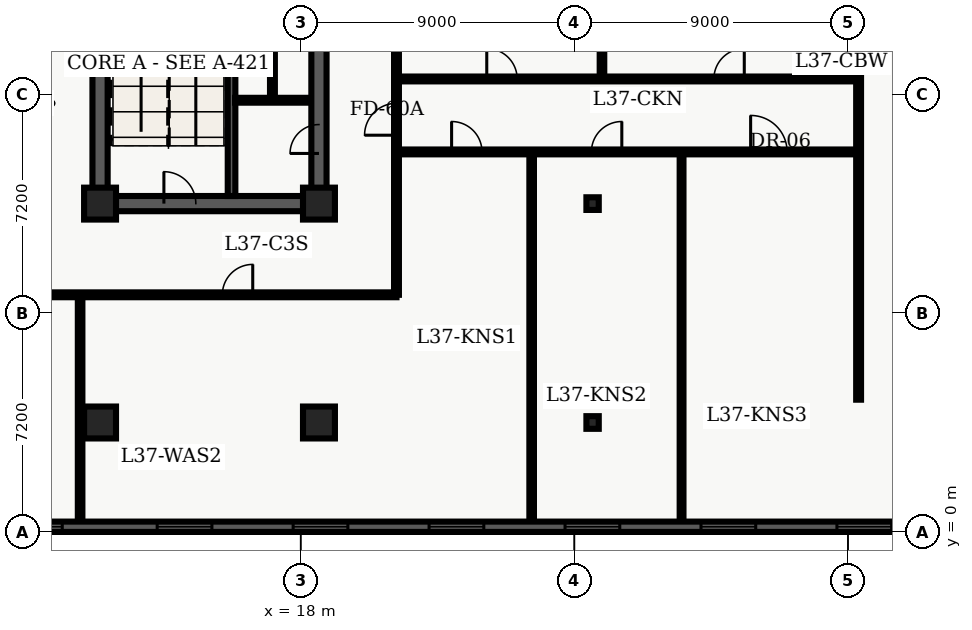
"""IFC4 building model, lengths in metres.
Left out: names, types, materials, properties, quantities, classifications, styles, units other than length and angle.
Written with IfcOpenShell. Run it as: python <this file> out.ifc"""

import sys

from ifc_helpers import new_model, entity, si_unit, converted_unit, direction, frame, origin_with_axes, origin_2d_with_axis, place, context, subcontext, project, spatial, polyline, rectangle, i_section, outline, extrude, element, fill, save


model = new_model("IFC4")
c1 = context("Model", 3, precision=1e-05, world=origin_with_axes(), true_north=direction((0.0, 1.0)))
c2 = subcontext(c1, "Body", "Model", "MODEL_VIEW")
j1 = project(units=[si_unit("LENGTHUNIT", "METRE"), converted_unit("PLANEANGLEUNIT", "DEGREE", entity("IfcPlaneAngleMeasure", 0.017), si_unit("PLANEANGLEUNIT", "RADIAN"), dimensions=[0, 0, 0, 0, 0, 0, 0])], contexts=[c1])
p1 = place(None, origin_with_axes())
s1 = spatial("IfcSite", under=j1, at=p1, CompositionType="ELEMENT")
p2 = place(p1, origin_with_axes())
s2 = spatial("IfcBuilding", under=s1, at=p2, CompositionType="ELEMENT")
p3 = place(p2, frame((0.0, 0.0, 152.4), z_axis=(0.0, 0.0, 1.0), x_axis=(1.0, 0.0, 0.0)))
s3 = spatial("IfcBuildingStorey", under=s2, at=p3, CompositionType="ELEMENT", Elevation=152.4)
p4 = place(p3, frame((11.4, 10.8, 0.0), z_axis=(0.0, 0.0, 1.0), x_axis=(0.0, 1.0, 0.0)))
e1 = element("IfcWall", 1, at=p4, inside=s3, PredefinedType="SHEAR", context=c2, shape_type="SweptSolid", body=[
    extrude(outline(polyline([(0.0, -0.25), (27.0, -0.25), (27.0, 0.25), (0.0, 0.25), (0.0, -0.25)])), origin_with_axes(), (0.0, 0.0, 1.0), 3.66),
])
p5 = place(p3, frame((11.4, 10.8, 0.0), z_axis=(0.0, 0.0, 1.0), x_axis=(1.0, 0.0, 0.0)))
e2 = element("IfcWall", 2, at=p5, inside=s3, PredefinedType="SHEAR", context=c2, shape_type="SweptSolid", body=[
    extrude(outline(polyline([(0.0, -0.25), (7.2, -0.25), (7.2, 0.25), (0.0, 0.25), (0.0, -0.25)])), origin_with_axes(), (0.0, 0.0, 1.0), 3.66),
])
p6 = place(p5, frame((2.625, 0.0, 0.0), z_axis=(0.0, 0.0, 1.0), x_axis=(1.0, 0.0, 0.0)))
e3 = element("IfcOpeningElement", 3, at=p6, cuts=e2, PredefinedType="OPENING", context=c2, shape_type="SweptSolid", body=[
    extrude(rectangle(XDim=1.05, YDim=0.52, at=origin_2d_with_axis()), origin_with_axes(), (0.0, 0.0, 1.0), 2.15),
])
p7 = place(p3, frame((18.6, 10.8, 0.0), z_axis=(0.0, 0.0, 1.0), x_axis=(0.0, 1.0, 0.0)))
e4 = element("IfcWall", 4, at=p7, inside=s3, PredefinedType="SHEAR", context=c2, shape_type="SweptSolid", body=[
    extrude(outline(polyline([(0.0, -0.25), (13.5, -0.25), (13.5, 0.25), (0.0, 0.25), (0.0, -0.25)])), origin_with_axes(), (0.0, 0.0, 1.0), 3.66),
])
p8 = place(p7, frame((11.125, 0.0, 0.0), z_axis=(0.0, 0.0, 1.0), x_axis=(1.0, 0.0, 0.0)))
e5 = element("IfcOpeningElement", 5, at=p8, cuts=e4, PredefinedType="OPENING", context=c2, shape_type="SweptSolid", body=[
    extrude(rectangle(XDim=1.05, YDim=0.52, at=origin_2d_with_axis()), origin_with_axes(), (0.0, 0.0, 1.0), 2.15),
])
p9 = place(p7, frame((2.125, 0.0, 0.0), z_axis=(0.0, 0.0, 1.0), x_axis=(1.0, 0.0, 0.0)))
e6 = element("IfcOpeningElement", 6, at=p9, cuts=e4, PredefinedType="OPENING", context=c2, shape_type="SweptSolid", body=[
    extrude(rectangle(XDim=0.95, YDim=0.52, at=origin_2d_with_axis()), origin_with_axes(), (0.0, 0.0, 1.0), 2.15),
])
p10 = place(p7, frame((6.275, 0.0, 0.0), z_axis=(0.0, 0.0, 1.0), x_axis=(1.0, 0.0, 0.0)))
e7 = element("IfcOpeningElement", 7, at=p10, cuts=e4, PredefinedType="OPENING", context=c2, shape_type="SweptSolid", body=[
    extrude(rectangle(XDim=0.95, YDim=0.52, at=origin_2d_with_axis()), origin_with_axes(), (0.0, 0.0, 1.0), 2.15),
])
p11 = place(p3, frame((15.725, 11.05, 0.0), z_axis=(0.0, 0.0, 1.0), x_axis=(0.0, 1.0, 0.0)))
e8 = element("IfcWall", 8, at=p11, inside=s3, PredefinedType="SHEAR", context=c2, shape_type="SweptSolid", body=[
    extrude(outline(polyline([(0.0, -0.125), (8.65, -0.125), (8.65, 0.125), (0.0, 0.125), (0.0, -0.125)])), origin_with_axes(), (0.0, 0.0, 1.0), 3.66),
])
for number, where, z_axis, x_axis in (
    (9, (11.4, 3.6, 0.0), (0.0, 0.0, 1.0), (1.0, 0.0, 0.0)),
    (10, (11.4, 10.8, 0.0), (0.0, 0.0, 1.0), (1.0, 0.0, 0.0)),
    (11, (18.6, 3.6, 0.0), (0.0, 0.0, 1.0), (1.0, 0.0, 0.0)),
    (12, (18.6, 10.8, 0.0), (0.0, 0.0, 1.0), (1.0, 0.0, 0.0)),
):
    element("IfcColumn", number, at=place(p3, frame(where, z_axis=z_axis, x_axis=x_axis)), inside=s3, PredefinedType="COLUMN", context=c2, shape_type="SweptSolid", body=[
        extrude(rectangle(XDim=1.05, YDim=1.05, at=origin_2d_with_axis()), origin_with_axes(), (0.0, 0.0, 1.0), 3.9),
    ])
for number, where, z_axis, x_axis in (
    (13, (27.6, 3.6, 0.0), (0.0, 0.0, 1.0), (1.0, 0.0, 0.0)),
    (14, (27.6, 10.8, 0.0), (0.0, 0.0, 1.0), (1.0, 0.0, 0.0)),
):
    element("IfcColumn", number, at=place(p3, frame(where, z_axis=z_axis, x_axis=x_axis)), inside=s3, PredefinedType="COLUMN", context=c2, shape_type="SweptSolid", body=[
        extrude(i_section(OverallWidth=0.406, OverallDepth=0.416, WebThickness=0.03, FlangeThickness=0.048, FilletRadius=0.022, at=origin_2d_with_axis()), origin_with_axes(), (0.0, 0.0, 1.0), 3.9),
    ])
p12 = place(p3, frame((15.84, 14.2, 0.0), z_axis=(0.0, 0.0, 1.0), x_axis=(1.0, 0.0, 0.0)))
e15 = element("IfcWall", 15, at=p12, inside=s3, PredefinedType="PARTITIONING", context=c2, shape_type="SweptSolid", body=[
    extrude(outline(polyline([(0.0, -0.08), (2.46, -0.08), (2.46, 0.08), (0.0, 0.08), (0.0, -0.08)])), origin_with_axes(), (0.0, 0.0, 1.0), 2.7),
])
p13 = place(p3, frame((17.07, 14.28, 0.0), z_axis=(0.0, 0.0, 1.0), x_axis=(0.0, 1.0, 0.0)))
e16 = element("IfcWall", 16, at=p13, inside=s3, PredefinedType="PARTITIONING", context=c2, shape_type="SweptSolid", body=[
    extrude(outline(polyline([(0.0, -0.08), (5.42, -0.08), (5.42, 0.08), (0.0, 0.08), (0.0, -0.08)])), origin_with_axes(), (0.0, 0.0, 1.0), 2.7),
])
p14 = place(p13, frame((2.6, 0.0, 0.0), z_axis=(0.0, 0.0, 1.0), x_axis=(1.0, 0.0, 0.0)))
e17 = element("IfcOpeningElement", 17, at=p14, cuts=e16, PredefinedType="OPENING", context=c2, shape_type="SweptSolid", body=[
    extrude(rectangle(XDim=0.9, YDim=0.18, at=origin_2d_with_axis()), origin_with_axes(), (0.0, 0.0, 1.0), 2.15),
])
p15 = place(p3, frame((2.6, 7.8, 0.0), z_axis=(0.0, 0.0, 1.0), x_axis=(1.0, 0.0, 0.0)))
e18 = element("IfcWall", 18, at=p15, inside=s3, PredefinedType="PARTITIONING", context=c2, shape_type="SweptSolid", body=[
    extrude(outline(polyline([(0.0, -0.08), (18.55, -0.08), (18.55, 0.08), (0.0, 0.08), (0.0, -0.08)])), origin_with_axes(), (0.0, 0.0, 1.0), 2.7),
])
p16 = place(p15, frame((3.787, 0.0, 0.0), z_axis=(0.0, 0.0, 1.0), x_axis=(1.0, 0.0, 0.0)))
e19 = element("IfcOpeningElement", 19, at=p16, cuts=e18, PredefinedType="OPENING", context=c2, shape_type="SweptSolid", body=[
    extrude(rectangle(XDim=1.0, YDim=0.18, at=origin_2d_with_axis()), origin_with_axes(), (0.0, 0.0, 1.0), 2.15),
])
p17 = place(p15, frame((13.322, 0.0, 0.0), z_axis=(0.0, 0.0, 1.0), x_axis=(1.0, 0.0, 0.0)))
e20 = element("IfcOpeningElement", 20, at=p17, cuts=e18, PredefinedType="OPENING", context=c2, shape_type="SweptSolid", body=[
    extrude(rectangle(XDim=1.0, YDim=0.18, at=origin_2d_with_axis()), origin_with_axes(), (0.0, 0.0, 1.0), 2.15),
])
p18 = place(p3, frame((21.15, 7.8, 0.0), z_axis=(0.0, 0.0, 1.0), x_axis=(0.0, 1.0, 0.0)))
e21 = element("IfcWall", 21, at=p18, inside=s3, PredefinedType="PARTITIONING", context=c2, shape_type="SweptSolid", body=[
    extrude(outline(polyline([(0.0, -0.08), (32.7, -0.08), (32.7, 0.08), (0.0, 0.08), (0.0, -0.08)])), origin_with_axes(), (0.0, 0.0, 1.0), 2.7),
])
p19 = place(p18, frame((5.775, 0.0, 0.0), z_axis=(0.0, 0.0, 1.0), x_axis=(1.0, 0.0, 0.0)))
e22 = element("IfcOpeningElement", 22, at=p19, cuts=e21, PredefinedType="OPENING", context=c2, shape_type="SweptSolid", body=[
    extrude(rectangle(XDim=1.05, YDim=0.18, at=origin_2d_with_axis()), origin_with_axes(), (0.0, 0.0, 1.0), 2.15),
])
p20 = place(p3, frame((10.744, 0.335, 0.0), z_axis=(0.0, 0.0, 1.0), x_axis=(0.0, 1.0, 0.0)))
e23 = element("IfcWall", 23, at=p20, inside=s3, PredefinedType="PARTITIONING", context=c2, shape_type="SweptSolid", body=[
    extrude(outline(polyline([(0.0, -0.075), (7.365, -0.075), (7.365, 0.075), (0.0, 0.075), (0.0, -0.075)])), origin_with_axes(), (0.0, 0.0, 1.0), 2.7),
])
p21 = place(p3, frame((21.15, 12.5, 0.0), z_axis=(0.0, 0.0, 1.0), x_axis=(1.0, 0.0, 0.0)))
e24 = element("IfcWall", 24, at=p21, inside=s3, PredefinedType="PARTITIONING", context=c2, shape_type="SweptSolid", body=[
    extrude(outline(polyline([(0.0, -0.08), (15.2, -0.08), (15.2, 0.08), (0.0, 0.08), (0.0, -0.08)])), origin_with_axes(), (0.0, 0.0, 1.0), 2.7),
])
p22 = place(p21, frame((2.313, 0.0, 0.0), z_axis=(0.0, 0.0, 1.0), x_axis=(1.0, 0.0, 0.0)))
e25 = element("IfcOpeningElement", 25, at=p22, cuts=e24, PredefinedType="OPENING", context=c2, shape_type="SweptSolid", body=[
    extrude(rectangle(XDim=1.0, YDim=0.18, at=origin_2d_with_axis()), origin_with_axes(), (0.0, 0.0, 1.0), 2.15),
])
p23 = place(p21, frame((6.912, 0.0, 0.0), z_axis=(0.0, 0.0, 1.0), x_axis=(1.0, 0.0, 0.0)))
e26 = element("IfcOpeningElement", 26, at=p23, cuts=e24, PredefinedType="OPENING", context=c2, shape_type="SweptSolid", body=[
    extrude(rectangle(XDim=1.0, YDim=0.18, at=origin_2d_with_axis()), origin_with_axes(), (0.0, 0.0, 1.0), 2.15),
])
p24 = place(p21, frame((12.248, 0.0, 0.0), z_axis=(0.0, 0.0, 1.0), x_axis=(1.0, 0.0, 0.0)))
e27 = element("IfcOpeningElement", 27, at=p24, cuts=e24, PredefinedType="OPENING", context=c2, shape_type="SweptSolid", body=[
    extrude(rectangle(XDim=1.2, YDim=0.18, at=origin_2d_with_axis()), origin_with_axes(), (0.0, 0.0, 1.0), 2.2),
])
p25 = place(p3, frame((21.15, 14.9, 0.0), z_axis=(0.0, 0.0, 1.0), x_axis=(1.0, 0.0, 0.0)))
e28 = element("IfcWall", 28, at=p25, inside=s3, PredefinedType="PARTITIONING", context=c2, shape_type="SweptSolid", body=[
    extrude(outline(polyline([(0.0, -0.08), (15.2, -0.08), (15.2, 0.08), (0.0, 0.08), (0.0, -0.08)])), origin_with_axes(), (0.0, 0.0, 1.0), 2.7),
])
p26 = place(p25, frame((3.47, 0.0, 0.0), z_axis=(0.0, 0.0, 1.0), x_axis=(1.0, 0.0, 0.0)))
e29 = element("IfcOpeningElement", 29, at=p26, cuts=e28, PredefinedType="OPENING", context=c2, shape_type="SweptSolid", body=[
    extrude(rectangle(XDim=1.0, YDim=0.18, at=origin_2d_with_axis()), origin_with_axes(), (0.0, 0.0, 1.0), 2.15),
])
p27 = place(p25, frame((10.94, 0.0, 0.0), z_axis=(0.0, 0.0, 1.0), x_axis=(1.0, 0.0, 0.0)))
e30 = element("IfcOpeningElement", 30, at=p27, cuts=e28, PredefinedType="OPENING", context=c2, shape_type="SweptSolid", body=[
    extrude(rectangle(XDim=1.0, YDim=0.18, at=origin_2d_with_axis()), origin_with_axes(), (0.0, 0.0, 1.0), 2.15),
])
p28 = place(p3, frame((36.35, 4.35, 0.0), z_axis=(0.0, 0.0, 1.0), x_axis=(0.0, 1.0, 0.0)))
e31 = element("IfcWall", 31, at=p28, inside=s3, PredefinedType="PARTITIONING", context=c2, shape_type="SweptSolid", body=[
    extrude(outline(polyline([(0.0, -0.08), (16.95, -0.08), (16.95, 0.08), (0.0, 0.08), (0.0, -0.08)])), origin_with_axes(), (0.0, 0.0, 1.0), 2.7),
])
p29 = place(p3, frame((25.596, 0.335, 0.0), z_axis=(0.0, 0.0, 1.0), x_axis=(0.0, 1.0, 0.0)))
e32 = element("IfcWall", 32, at=p29, inside=s3, PredefinedType="PARTITIONING", context=c2, shape_type="SweptSolid", body=[
    extrude(outline(polyline([(0.0, -0.075), (12.045, -0.075), (12.045, 0.075), (0.0, 0.075), (0.0, -0.075)])), origin_with_axes(), (0.0, 0.0, 1.0), 2.7),
])
p30 = place(p3, frame((30.527, 0.335, 0.0), z_axis=(0.0, 0.0, 1.0), x_axis=(0.0, 1.0, 0.0)))
e33 = element("IfcWall", 33, at=p30, inside=s3, PredefinedType="PARTITIONING", context=c2, shape_type="SweptSolid", body=[
    extrude(outline(polyline([(0.0, -0.062), (12.045, -0.062), (12.045, 0.062), (0.0, 0.062), (0.0, -0.062)])), origin_with_axes(), (0.0, 0.0, 1.0), 2.7),
])
p31 = place(p3, frame((27.909, 15.02, 0.0), z_axis=(0.0, 0.0, 1.0), x_axis=(0.0, 1.0, 0.0)))
e34 = element("IfcWall", 34, at=p31, inside=s3, PredefinedType="PARTITIONING", context=c2, shape_type="SweptSolid", body=[
    extrude(outline(polyline([(0.0, -0.075), (6.245, -0.075), (6.245, 0.075), (0.0, 0.075), (0.0, -0.075)])), origin_with_axes(), (0.0, 0.0, 1.0), 2.7),
])
p32 = place(p3, frame((57.26, 0.17, 0.0), z_axis=(0.0, 0.0, 1.0), x_axis=(-1.0, 0.0, 0.0)))
e35 = element("IfcWall", 35, at=p32, inside=s3, PredefinedType="SOLIDWALL", context=c2, shape_type="SweptSolid", body=[
    extrude(outline(polyline([(0.0, -0.17), (54.86, -0.17), (54.86, 0.17), (0.0, 0.17), (0.0, -0.17)])), origin_with_axes(), (0.0, 0.0, 1.0), 3.66),
])
p33 = place(p32, frame((2.836, 0.0, 0.45), z_axis=(0.0, 0.0, 1.0), x_axis=(1.0, 0.0, 0.0)))
e36 = element("IfcOpeningElement", 36, at=p33, cuts=e35, PredefinedType="OPENING", context=c2, shape_type="SweptSolid", body=[
    extrude(rectangle(XDim=1.8, YDim=0.36, at=origin_2d_with_axis()), origin_with_axes(), (0.0, 0.0, 1.0), 2.1),
])
p34 = place(p32, frame((7.307, 0.0, 0.45), z_axis=(0.0, 0.0, 1.0), x_axis=(1.0, 0.0, 0.0)))
e37 = element("IfcOpeningElement", 37, at=p34, cuts=e35, PredefinedType="OPENING", context=c2, shape_type="SweptSolid", body=[
    extrude(rectangle(XDim=1.8, YDim=0.36, at=origin_2d_with_axis()), origin_with_axes(), (0.0, 0.0, 1.0), 2.1),
])
p35 = place(p32, frame((11.779, 0.0, 0.45), z_axis=(0.0, 0.0, 1.0), x_axis=(1.0, 0.0, 0.0)))
e38 = element("IfcOpeningElement", 38, at=p35, cuts=e35, PredefinedType="OPENING", context=c2, shape_type="SweptSolid", body=[
    extrude(rectangle(XDim=1.8, YDim=0.36, at=origin_2d_with_axis()), origin_with_axes(), (0.0, 0.0, 1.0), 2.1),
])
p36 = place(p32, frame((16.251, 0.0, 0.45), z_axis=(0.0, 0.0, 1.0), x_axis=(1.0, 0.0, 0.0)))
e39 = element("IfcOpeningElement", 39, at=p36, cuts=e35, PredefinedType="OPENING", context=c2, shape_type="SweptSolid", body=[
    extrude(rectangle(XDim=1.8, YDim=0.36, at=origin_2d_with_axis()), origin_with_axes(), (0.0, 0.0, 1.0), 2.1),
])
p37 = place(p32, frame((20.723, 0.0, 0.45), z_axis=(0.0, 0.0, 1.0), x_axis=(1.0, 0.0, 0.0)))
e40 = element("IfcOpeningElement", 40, at=p37, cuts=e35, PredefinedType="OPENING", context=c2, shape_type="SweptSolid", body=[
    extrude(rectangle(XDim=1.8, YDim=0.36, at=origin_2d_with_axis()), origin_with_axes(), (0.0, 0.0, 1.0), 2.1),
])
p38 = place(p32, frame((25.194, 0.0, 0.45), z_axis=(0.0, 0.0, 1.0), x_axis=(1.0, 0.0, 0.0)))
e41 = element("IfcOpeningElement", 41, at=p38, cuts=e35, PredefinedType="OPENING", context=c2, shape_type="SweptSolid", body=[
    extrude(rectangle(XDim=1.8, YDim=0.36, at=origin_2d_with_axis()), origin_with_axes(), (0.0, 0.0, 1.0), 2.1),
])
p39 = place(p32, frame((29.666, 0.0, 0.45), z_axis=(0.0, 0.0, 1.0), x_axis=(1.0, 0.0, 0.0)))
e42 = element("IfcOpeningElement", 42, at=p39, cuts=e35, PredefinedType="OPENING", context=c2, shape_type="SweptSolid", body=[
    extrude(rectangle(XDim=1.8, YDim=0.36, at=origin_2d_with_axis()), origin_with_axes(), (0.0, 0.0, 1.0), 2.1),
])
p40 = place(p32, frame((34.138, 0.0, 0.45), z_axis=(0.0, 0.0, 1.0), x_axis=(1.0, 0.0, 0.0)))
e43 = element("IfcOpeningElement", 43, at=p40, cuts=e35, PredefinedType="OPENING", context=c2, shape_type="SweptSolid", body=[
    extrude(rectangle(XDim=1.8, YDim=0.36, at=origin_2d_with_axis()), origin_with_axes(), (0.0, 0.0, 1.0), 2.1),
])
p41 = place(p32, frame((38.609, 0.0, 0.45), z_axis=(0.0, 0.0, 1.0), x_axis=(1.0, 0.0, 0.0)))
e44 = element("IfcOpeningElement", 44, at=p41, cuts=e35, PredefinedType="OPENING", context=c2, shape_type="SweptSolid", body=[
    extrude(rectangle(XDim=1.8, YDim=0.36, at=origin_2d_with_axis()), origin_with_axes(), (0.0, 0.0, 1.0), 2.1),
])
p42 = place(p32, frame((43.081, 0.0, 0.45), z_axis=(0.0, 0.0, 1.0), x_axis=(1.0, 0.0, 0.0)))
e45 = element("IfcOpeningElement", 45, at=p42, cuts=e35, PredefinedType="OPENING", context=c2, shape_type="SweptSolid", body=[
    extrude(rectangle(XDim=1.8, YDim=0.36, at=origin_2d_with_axis()), origin_with_axes(), (0.0, 0.0, 1.0), 2.1),
])
p43 = place(p32, frame((48.003, 0.0, 0.45), z_axis=(0.0, 0.0, 1.0), x_axis=(1.0, 0.0, 0.0)))
e46 = element("IfcOpeningElement", 46, at=p43, cuts=e35, PredefinedType="OPENING", context=c2, shape_type="SweptSolid", body=[
    extrude(rectangle(XDim=1.8, YDim=0.36, at=origin_2d_with_axis()), origin_with_axes(), (0.0, 0.0, 1.0), 2.1),
])
p44 = place(p32, frame((52.024, 0.0, 0.45), z_axis=(0.0, 0.0, 1.0), x_axis=(1.0, 0.0, 0.0)))
e47 = element("IfcOpeningElement", 47, at=p44, cuts=e35, PredefinedType="OPENING", context=c2, shape_type="SweptSolid", body=[
    extrude(rectangle(XDim=1.8, YDim=0.36, at=origin_2d_with_axis()), origin_with_axes(), (0.0, 0.0, 1.0), 2.1),
])
p45 = place(p5, frame((2.625, 0.0, 0.0), z_axis=(0.0, 0.0, 1.0), x_axis=(1.0, 0.0, 0.0)))
e48 = element("IfcDoor", 48, at=p45, inside=s3, OperationType="SINGLE_SWING_LEFT", PredefinedType="DOOR", context=c2, shape_type="SweptSolid", body=[
    extrude(rectangle(XDim=1.05, YDim=0.09, at=origin_2d_with_axis()), origin_with_axes(), (0.0, 0.0, 1.0), 2.15),
])
fill(e3, e48)
p46 = place(p7, frame((2.125, 0.0, 0.0), z_axis=(0.0, 0.0, 1.0), x_axis=(1.0, 0.0, 0.0)))
e49 = element("IfcDoor", 49, at=p46, inside=s3, OperationType="SINGLE_SWING_LEFT", PredefinedType="DOOR", context=c2, shape_type="SweptSolid", body=[
    extrude(rectangle(XDim=0.95, YDim=0.09, at=origin_2d_with_axis()), origin_with_axes(), (0.0, 0.0, 1.0), 2.15),
])
fill(e6, e49)
p47 = place(p15, frame((13.322, 0.0, 0.0), z_axis=(0.0, 0.0, 1.0), x_axis=(1.0, 0.0, 0.0)))
e50 = element("IfcDoor", 50, at=p47, inside=s3, OperationType="SINGLE_SWING_RIGHT", PredefinedType="DOOR", context=c2, shape_type="SweptSolid", body=[
    extrude(rectangle(XDim=1.0, YDim=0.09, at=origin_2d_with_axis()), origin_with_axes(), (0.0, 0.0, 1.0), 2.15),
])
fill(e20, e50)
p48 = place(p18, frame((5.775, 0.0, 0.0), z_axis=(0.0, 0.0, 1.0), x_axis=(1.0, 0.0, 0.0)))
e51 = element("IfcDoor", 51, at=p48, inside=s3, OperationType="SINGLE_SWING_LEFT", PredefinedType="DOOR", context=c2, shape_type="SweptSolid", body=[
    extrude(rectangle(XDim=1.05, YDim=0.09, at=origin_2d_with_axis()), origin_with_axes(), (0.0, 0.0, 1.0), 2.15),
])
fill(e22, e51)
p49 = place(p21, frame((2.313, 0.0, 0.0), z_axis=(0.0, 0.0, 1.0), x_axis=(1.0, 0.0, 0.0)))
e52 = element("IfcDoor", 52, at=p49, inside=s3, OperationType="SINGLE_SWING_LEFT", PredefinedType="DOOR", context=c2, shape_type="SweptSolid", body=[
    extrude(rectangle(XDim=1.0, YDim=0.09, at=origin_2d_with_axis()), origin_with_axes(), (0.0, 0.0, 1.0), 2.15),
])
fill(e25, e52)
p50 = place(p21, frame((6.912, 0.0, 0.0), z_axis=(0.0, 0.0, 1.0), x_axis=(1.0, 0.0, 0.0)))
e53 = element("IfcDoor", 53, at=p50, inside=s3, OperationType="SINGLE_SWING_RIGHT", PredefinedType="DOOR", context=c2, shape_type="SweptSolid", body=[
    extrude(rectangle(XDim=1.0, YDim=0.09, at=origin_2d_with_axis()), origin_with_axes(), (0.0, 0.0, 1.0), 2.15),
])
fill(e26, e53)
p51 = place(p21, frame((12.248, 0.0, 0.0), z_axis=(0.0, 0.0, 1.0), x_axis=(1.0, 0.0, 0.0)))
e54 = element("IfcDoor", 54, at=p51, inside=s3, OperationType="SINGLE_SWING_LEFT", PredefinedType="DOOR", context=c2, shape_type="SweptSolid", body=[
    extrude(rectangle(XDim=1.2, YDim=0.09, at=origin_2d_with_axis()), origin_with_axes(), (0.0, 0.0, 1.0), 2.2),
])
fill(e27, e54)
p52 = place(p25, frame((3.47, 0.0, 0.0), z_axis=(0.0, 0.0, 1.0), x_axis=(1.0, 0.0, 0.0)))
e55 = element("IfcDoor", 55, at=p52, inside=s3, OperationType="SINGLE_SWING_LEFT", PredefinedType="DOOR", context=c2, shape_type="SweptSolid", body=[
    extrude(rectangle(XDim=1.0, YDim=0.09, at=origin_2d_with_axis()), origin_with_axes(), (0.0, 0.0, 1.0), 2.15),
])
fill(e29, e55)
p53 = place(p25, frame((10.94, 0.0, 0.0), z_axis=(0.0, 0.0, 1.0), x_axis=(1.0, 0.0, 0.0)))
e56 = element("IfcDoor", 56, at=p53, inside=s3, OperationType="SINGLE_SWING_RIGHT", PredefinedType="DOOR", context=c2, shape_type="SweptSolid", body=[
    extrude(rectangle(XDim=1.0, YDim=0.09, at=origin_2d_with_axis()), origin_with_axes(), (0.0, 0.0, 1.0), 2.15),
])
fill(e30, e56)
p54 = place(p32, frame((20.723, 0.0, 0.45), z_axis=(0.0, 0.0, 1.0), x_axis=(1.0, 0.0, 0.0)))
e57 = element("IfcWindow", 57, at=p54, inside=s3, PredefinedType="WINDOW", context=c2, shape_type="SweptSolid", body=[
    extrude(rectangle(XDim=1.8, YDim=0.09, at=origin_2d_with_axis()), origin_with_axes(), (0.0, 0.0, 1.0), 2.1),
])
fill(e40, e57)
p55 = place(p32, frame((25.194, 0.0, 0.45), z_axis=(0.0, 0.0, 1.0), x_axis=(1.0, 0.0, 0.0)))
e58 = element("IfcWindow", 58, at=p55, inside=s3, PredefinedType="WINDOW", context=c2, shape_type="SweptSolid", body=[
    extrude(rectangle(XDim=1.8, YDim=0.09, at=origin_2d_with_axis()), origin_with_axes(), (0.0, 0.0, 1.0), 2.1),
])
fill(e41, e58)
p56 = place(p32, frame((29.666, 0.0, 0.45), z_axis=(0.0, 0.0, 1.0), x_axis=(1.0, 0.0, 0.0)))
e59 = element("IfcWindow", 59, at=p56, inside=s3, PredefinedType="WINDOW", context=c2, shape_type="SweptSolid", body=[
    extrude(rectangle(XDim=1.8, YDim=0.09, at=origin_2d_with_axis()), origin_with_axes(), (0.0, 0.0, 1.0), 2.1),
])
fill(e42, e59)
p57 = place(p32, frame((34.138, 0.0, 0.45), z_axis=(0.0, 0.0, 1.0), x_axis=(1.0, 0.0, 0.0)))
e60 = element("IfcWindow", 60, at=p57, inside=s3, PredefinedType="WINDOW", context=c2, shape_type="SweptSolid", body=[
    extrude(rectangle(XDim=1.8, YDim=0.09, at=origin_2d_with_axis()), origin_with_axes(), (0.0, 0.0, 1.0), 2.1),
])
fill(e43, e60)
p58 = place(p32, frame((38.609, 0.0, 0.45), z_axis=(0.0, 0.0, 1.0), x_axis=(1.0, 0.0, 0.0)))
e61 = element("IfcWindow", 61, at=p58, inside=s3, PredefinedType="WINDOW", context=c2, shape_type="SweptSolid", body=[
    extrude(rectangle(XDim=1.8, YDim=0.09, at=origin_2d_with_axis()), origin_with_axes(), (0.0, 0.0, 1.0), 2.1),
])
fill(e44, e61)
p59 = place(p32, frame((43.081, 0.0, 0.45), z_axis=(0.0, 0.0, 1.0), x_axis=(1.0, 0.0, 0.0)))
e62 = element("IfcWindow", 62, at=p59, inside=s3, PredefinedType="WINDOW", context=c2, shape_type="SweptSolid", body=[
    extrude(rectangle(XDim=1.8, YDim=0.09, at=origin_2d_with_axis()), origin_with_axes(), (0.0, 0.0, 1.0), 2.1),
])
fill(e45, e62)
p60 = place(p32, frame((48.003, 0.0, 0.45), z_axis=(0.0, 0.0, 1.0), x_axis=(1.0, 0.0, 0.0)))
e63 = element("IfcWindow", 63, at=p60, inside=s3, PredefinedType="WINDOW", context=c2, shape_type="SweptSolid", body=[
    extrude(rectangle(XDim=1.8, YDim=0.09, at=origin_2d_with_axis()), origin_with_axes(), (0.0, 0.0, 1.0), 2.1),
])
fill(e46, e63)
save(model, sys.argv[1])
